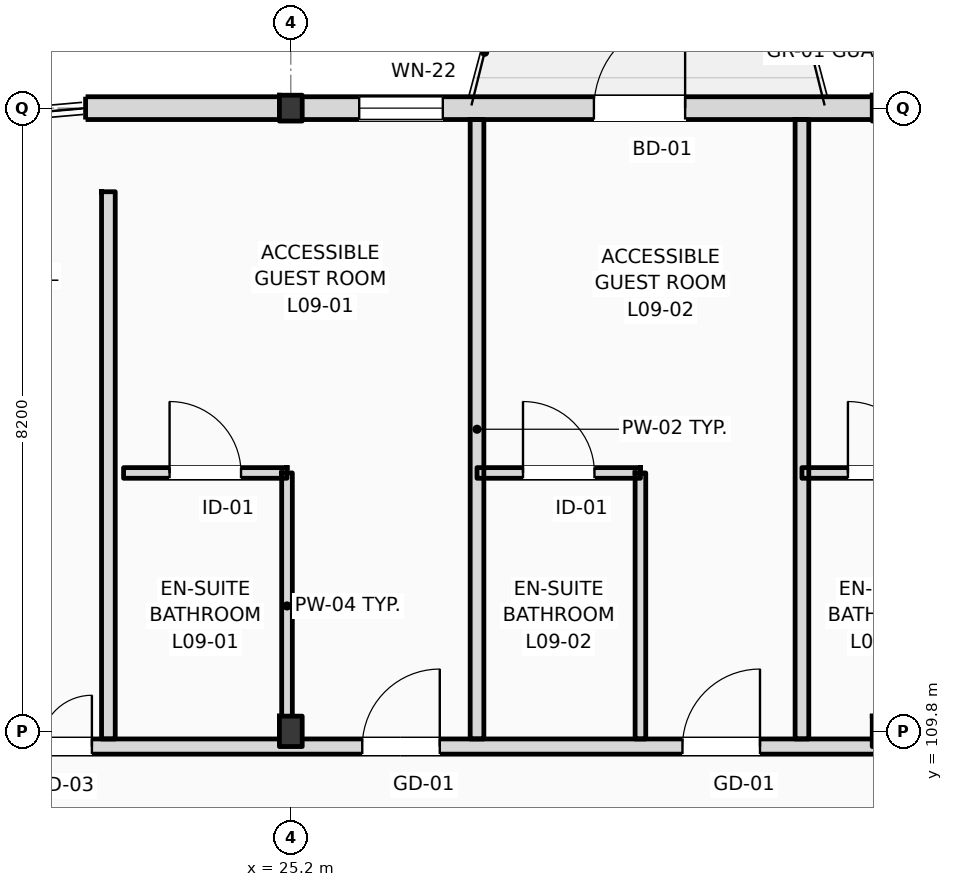
"""IFC4 building model, lengths in metres.
Left out: names, types, materials, properties, quantities, classifications, styles, units other than length and angle.
Written with IfcOpenShell. Run it as: python <this file> out.ifc"""

import sys

from ifc_helpers import new_model, si_unit, direction, frame, frame_2d, origin, origin_2d, place, context, subcontext, project, spatial, rectangle, i_section, extrude, element, fill, save


model = new_model("IFC4")
c1 = context("Model", 3, precision=1e-05, world=origin(), true_north=direction((0.0, 1.0)))
c2 = subcontext(c1, "Body", "Model", "MODEL_VIEW")
j1 = project(units=[si_unit("LENGTHUNIT", "METRE"), si_unit("PLANEANGLEUNIT", "RADIAN")], contexts=[c1])
p1 = place(None, origin())
s1 = spatial("IfcSite", under=j1, at=p1, CompositionType="ELEMENT")
p2 = place(p1, origin())
s2 = spatial("IfcBuilding", under=s1, at=p2, CompositionType="ELEMENT")
p3 = place(p2, frame((0.0, 0.0, 39.0)))
s3 = spatial("IfcBuildingStorey", under=s2, at=p3, CompositionType="ELEMENT", Elevation=39.0)
p4 = place(p3, frame((25.2, 109.8, 0.0), z_axis=(0.0, 0.0, 1.0), x_axis=(1.0, 0.0, 0.0)))
e1 = element("IfcColumn", 1, at=p4, inside=s3, PredefinedType="COLUMN", context=c2, shape_type="SweptSolid", body=[
    extrude(i_section(OverallWidth=0.3, OverallDepth=0.4, WebThickness=0.013, FlangeThickness=0.024, FilletRadius=0.027, at=origin_2d()), origin(), (0.0, 0.0, 1.0), 3.6),
])
p5 = place(p3, frame((25.2, 118.0, 0.0), z_axis=(0.0, 0.0, 1.0), x_axis=(1.0, 0.0, 0.0)))
e2 = element("IfcColumn", 2, at=p5, inside=s3, PredefinedType="COLUMN", context=c2, shape_type="SweptSolid", body=[
    extrude(i_section(OverallWidth=0.3, OverallDepth=0.34, WebThickness=0.012, FlangeThickness=0.021, FilletRadius=0.027, at=origin_2d()), origin(), (0.0, 0.0, 1.0), 3.6),
])
p6 = place(p3, frame((33.0, 109.8, 0.0), z_axis=(0.0, 0.0, 1.0), x_axis=(1.0, 0.0, 0.0)))
e3 = element("IfcColumn", 3, at=p6, inside=s3, PredefinedType="COLUMN", context=c2, shape_type="SweptSolid", body=[
    extrude(i_section(OverallWidth=0.3, OverallDepth=0.4, WebThickness=0.013, FlangeThickness=0.024, FilletRadius=0.027, at=origin_2d()), origin(), (0.0, 0.0, 1.0), 3.6),
])
p7 = place(p3, frame((33.0, 118.0, 0.0), z_axis=(0.0, 0.0, 1.0), x_axis=(1.0, 0.0, 0.0)))
e4 = element("IfcColumn", 4, at=p7, inside=s3, PredefinedType="COLUMN", context=c2, shape_type="SweptSolid", body=[
    extrude(i_section(OverallWidth=0.3, OverallDepth=0.34, WebThickness=0.012, FlangeThickness=0.021, FilletRadius=0.027, at=origin_2d()), origin(), (0.0, 0.0, 1.0), 3.6),
])
p8 = place(p3, frame((22.5, 118.0, 0.0), z_axis=(0.0, 0.0, 1.0), x_axis=(1.0, 0.0, 0.0)))
e5 = element("IfcWall", 5, at=p8, inside=s3, PredefinedType="STANDARD", context=c2, shape_type="SweptSolid", body=[
    extrude(rectangle(XDim=72.9, YDim=0.3, at=frame_2d((36.45, 0.0))), origin(), (0.0, 0.0, 1.0), 2.92),
])
p9 = place(p8, frame((3.6, 0.0, 0.9)))
e6 = element("IfcOpeningElement", 6, at=p9, cuts=e5, PredefinedType="OPENING", context=c2, shape_type="SweptSolid", body=[
    extrude(rectangle(XDim=1.1, YDim=1.6, at=frame_2d((0.55, 0.8))), frame((0.0, 0.16, 0.0), z_axis=(0.0, -1.0, 0.0), x_axis=(1.0, 0.0, 0.0)), (0.0, 0.0, 1.0), 0.32),
])
p10 = place(p8, frame((6.688, 0.0, 0.0)))
e7 = element("IfcOpeningElement", 7, at=p10, cuts=e5, PredefinedType="OPENING", context=c2, shape_type="SweptSolid", body=[
    extrude(rectangle(XDim=1.2, YDim=2.25, at=frame_2d((0.6, 1.125))), frame((0.0, 0.16, 0.0), z_axis=(0.0, -1.0, 0.0), x_axis=(1.0, 0.0, 0.0)), (0.0, 0.0, 1.0), 0.32),
])
p11 = place(p8, frame((11.388, 0.0, 0.9)))
e8 = element("IfcOpeningElement", 8, at=p11, cuts=e5, PredefinedType="OPENING", context=c2, shape_type="SweptSolid", body=[
    extrude(rectangle(XDim=1.6, YDim=1.75, at=frame_2d((0.8, 0.875))), frame((0.0, 0.16, 0.0), z_axis=(0.0, -1.0, 0.0), x_axis=(1.0, 0.0, 0.0)), (0.0, 0.0, 1.0), 0.32),
])
p12 = place(p8, frame((15.413, 0.0, 0.9)))
e9 = element("IfcOpeningElement", 9, at=p12, cuts=e5, PredefinedType="OPENING", context=c2, shape_type="SweptSolid", body=[
    extrude(rectangle(XDim=1.75, YDim=1.84, at=frame_2d((0.875, 0.92))), frame((0.0, 0.16, 0.0), z_axis=(0.0, -1.0, 0.0), x_axis=(1.0, 0.0, 0.0)), (0.0, 0.0, 1.0), 0.32),
])
p13 = place(p8, frame((21.245, 0.0, 0.0)))
e10 = element("IfcOpeningElement", 10, at=p13, cuts=e5, PredefinedType="OPENING", context=c2, shape_type="SweptSolid", body=[
    extrude(rectangle(XDim=1.2, YDim=2.25, at=frame_2d((0.6, 1.125))), frame((0.0, 0.16, 0.0), z_axis=(0.0, -1.0, 0.0), x_axis=(1.0, 0.0, 0.0)), (0.0, 0.0, 1.0), 0.32),
])
p14 = place(p8, frame((23.705, 0.0, 0.0)))
e11 = element("IfcOpeningElement", 11, at=p14, cuts=e5, PredefinedType="OPENING", context=c2, shape_type="SweptSolid", body=[
    extrude(rectangle(XDim=1.2, YDim=2.25, at=frame_2d((0.6, 1.125))), frame((0.0, 0.16, 0.0), z_axis=(0.0, -1.0, 0.0), x_axis=(1.0, 0.0, 0.0)), (0.0, 0.0, 1.0), 0.32),
])
p15 = place(p8, frame((28.488, 0.0, 0.9)))
e12 = element("IfcOpeningElement", 12, at=p15, cuts=e5, PredefinedType="OPENING", context=c2, shape_type="SweptSolid", body=[
    extrude(rectangle(XDim=2.6, YDim=1.84, at=frame_2d((1.3, 0.92))), frame((0.0, 0.16, 0.0), z_axis=(0.0, -1.0, 0.0), x_axis=(1.0, 0.0, 0.0)), (0.0, 0.0, 1.0), 0.32),
])
p16 = place(p8, frame((34.76, 0.0, 0.9)))
e13 = element("IfcOpeningElement", 13, at=p16, cuts=e5, PredefinedType="OPENING", context=c2, shape_type="SweptSolid", body=[
    extrude(rectangle(XDim=1.1, YDim=1.84, at=frame_2d((0.55, 0.92))), frame((0.0, 0.16, 0.0), z_axis=(0.0, -1.0, 0.0), x_axis=(1.0, 0.0, 0.0)), (0.0, 0.0, 1.0), 0.32),
])
p17 = place(p8, frame((38.143, 0.0, 0.0)))
e14 = element("IfcOpeningElement", 14, at=p17, cuts=e5, PredefinedType="OPENING", context=c2, shape_type="SweptSolid", body=[
    extrude(rectangle(XDim=1.2, YDim=2.25, at=frame_2d((0.6, 1.125))), frame((0.0, 0.16, 0.0), z_axis=(0.0, -1.0, 0.0), x_axis=(1.0, 0.0, 0.0)), (0.0, 0.0, 1.0), 0.32),
])
p18 = place(p8, frame((42.687, 0.0, 0.9)))
e15 = element("IfcOpeningElement", 15, at=p18, cuts=e5, PredefinedType="OPENING", context=c2, shape_type="SweptSolid", body=[
    extrude(rectangle(XDim=1.2, YDim=1.8, at=frame_2d((0.6, 0.9))), frame((0.0, 0.16, 0.0), z_axis=(0.0, -1.0, 0.0), x_axis=(1.0, 0.0, 0.0)), (0.0, 0.0, 1.0), 0.32),
])
p19 = place(p8, frame((47.112, 0.0, 0.9)))
e16 = element("IfcOpeningElement", 16, at=p19, cuts=e5, PredefinedType="OPENING", context=c2, shape_type="SweptSolid", body=[
    extrude(rectangle(XDim=1.35, YDim=1.84, at=frame_2d((0.675, 0.92))), frame((0.0, 0.16, 0.0), z_axis=(0.0, -1.0, 0.0), x_axis=(1.0, 0.0, 0.0)), (0.0, 0.0, 1.0), 0.32),
])
p20 = place(p8, frame((52.482, 0.0, 0.0)))
e17 = element("IfcOpeningElement", 17, at=p20, cuts=e5, PredefinedType="OPENING", context=c2, shape_type="SweptSolid", body=[
    extrude(rectangle(XDim=1.2, YDim=2.25, at=frame_2d((0.6, 1.125))), frame((0.0, 0.16, 0.0), z_axis=(0.0, -1.0, 0.0), x_axis=(1.0, 0.0, 0.0)), (0.0, 0.0, 1.0), 0.32),
])
p21 = place(p8, frame((54.942, 0.0, 0.0)))
e18 = element("IfcOpeningElement", 18, at=p21, cuts=e5, PredefinedType="OPENING", context=c2, shape_type="SweptSolid", body=[
    extrude(rectangle(XDim=1.2, YDim=2.25, at=frame_2d((0.6, 1.125))), frame((0.0, 0.16, 0.0), z_axis=(0.0, -1.0, 0.0), x_axis=(1.0, 0.0, 0.0)), (0.0, 0.0, 1.0), 0.32),
])
p22 = place(p8, frame((60.387, 0.0, 0.9)))
e19 = element("IfcOpeningElement", 19, at=p22, cuts=e5, PredefinedType="OPENING", context=c2, shape_type="SweptSolid", body=[
    extrude(rectangle(XDim=1.8, YDim=1.84, at=frame_2d((0.9, 0.92))), frame((0.0, 0.16, 0.0), z_axis=(0.0, -1.0, 0.0), x_axis=(1.0, 0.0, 0.0)), (0.0, 0.0, 1.0), 0.32),
])
p23 = place(p8, frame((66.013, 0.0, 0.9)))
e20 = element("IfcOpeningElement", 20, at=p23, cuts=e5, PredefinedType="OPENING", context=c2, shape_type="SweptSolid", body=[
    extrude(rectangle(XDim=1.35, YDim=1.84, at=frame_2d((0.675, 0.92))), frame((0.0, 0.16, 0.0), z_axis=(0.0, -1.0, 0.0), x_axis=(1.0, 0.0, 0.0)), (0.0, 0.0, 1.0), 0.32),
])
p24 = place(p8, frame((69.275, 0.0, 0.9)))
e21 = element("IfcOpeningElement", 21, at=p24, cuts=e5, PredefinedType="OPENING", context=c2, shape_type="SweptSolid", body=[
    extrude(rectangle(XDim=2.1, YDim=1.84, at=frame_2d((1.05, 0.92))), frame((0.0, 0.16, 0.0), z_axis=(0.0, -1.0, 0.0), x_axis=(1.0, 0.0, 0.0)), (0.0, 0.0, 1.0), 0.32),
])
p25 = place(p3, frame((10.65, 109.6, 0.0), z_axis=(0.0, 0.0, 1.0), x_axis=(1.0, 0.0, 0.0)))
e22 = element("IfcWall", 22, at=p25, inside=s3, PredefinedType="PARTITIONING", context=c2, shape_type="SweptSolid", body=[
    extrude(rectangle(XDim=84.61, YDim=0.2, at=frame_2d((42.305, 0.0))), origin(), (0.0, 0.0, 1.0), 2.82),
])
p26 = place(p25, frame((15.49, 0.0, 0.0)))
e23 = element("IfcOpeningElement", 23, at=p26, cuts=e22, PredefinedType="OPENING", context=c2, shape_type="SweptSolid", body=[
    extrude(rectangle(XDim=1.02, YDim=2.2, at=frame_2d((0.51, 1.1))), frame((0.0, 0.11, 0.0), z_axis=(0.0, -1.0, 0.0), x_axis=(1.0, 0.0, 0.0)), (0.0, 0.0, 1.0), 0.22),
])
p27 = place(p25, frame((19.703, 0.0, 0.0)))
e24 = element("IfcOpeningElement", 24, at=p27, cuts=e22, PredefinedType="OPENING", context=c2, shape_type="SweptSolid", body=[
    extrude(rectangle(XDim=1.02, YDim=2.2, at=frame_2d((0.51, 1.1))), frame((0.0, 0.11, 0.0), z_axis=(0.0, -1.0, 0.0), x_axis=(1.0, 0.0, 0.0)), (0.0, 0.0, 1.0), 0.22),
])
p28 = place(p25, frame((24.203, 0.0, 0.0)))
e25 = element("IfcOpeningElement", 25, at=p28, cuts=e22, PredefinedType="OPENING", context=c2, shape_type="SweptSolid", body=[
    extrude(rectangle(XDim=1.02, YDim=2.2, at=frame_2d((0.51, 1.1))), frame((0.0, 0.11, 0.0), z_axis=(0.0, -1.0, 0.0), x_axis=(1.0, 0.0, 0.0)), (0.0, 0.0, 1.0), 0.22),
])
p29 = place(p25, frame((26.552, 0.0, 0.0)))
e26 = element("IfcOpeningElement", 26, at=p29, cuts=e22, PredefinedType="OPENING", context=c2, shape_type="SweptSolid", body=[
    extrude(rectangle(XDim=1.02, YDim=2.2, at=frame_2d((0.51, 1.1))), frame((0.0, 0.11, 0.0), z_axis=(0.0, -1.0, 0.0), x_axis=(1.0, 0.0, 0.0)), (0.0, 0.0, 1.0), 0.22),
])
p30 = place(p25, frame((33.233, 0.0, 0.0)))
e27 = element("IfcOpeningElement", 27, at=p30, cuts=e22, PredefinedType="OPENING", context=c2, shape_type="SweptSolid", body=[
    extrude(rectangle(XDim=0.96, YDim=2.2, at=frame_2d((0.48, 1.1))), frame((0.0, 0.11, 0.0), z_axis=(0.0, -1.0, 0.0), x_axis=(1.0, 0.0, 0.0)), (0.0, 0.0, 1.0), 0.22),
])
p31 = place(p25, frame((35.583, 0.0, 0.0)))
e28 = element("IfcOpeningElement", 28, at=p31, cuts=e22, PredefinedType="OPENING", context=c2, shape_type="SweptSolid", body=[
    extrude(rectangle(XDim=0.96, YDim=2.2, at=frame_2d((0.48, 1.1))), frame((0.0, 0.11, 0.0), z_axis=(0.0, -1.0, 0.0), x_axis=(1.0, 0.0, 0.0)), (0.0, 0.0, 1.0), 0.22),
])
p32 = place(p25, frame((42.233, 0.0, 0.0)))
e29 = element("IfcOpeningElement", 29, at=p32, cuts=e22, PredefinedType="OPENING", context=c2, shape_type="SweptSolid", body=[
    extrude(rectangle(XDim=0.96, YDim=2.2, at=frame_2d((0.48, 1.1))), frame((0.0, 0.11, 0.0), z_axis=(0.0, -1.0, 0.0), x_axis=(1.0, 0.0, 0.0)), (0.0, 0.0, 1.0), 0.22),
])
p33 = place(p25, frame((46.983, 0.0, 0.0)))
e30 = element("IfcOpeningElement", 30, at=p33, cuts=e22, PredefinedType="OPENING", context=c2, shape_type="SweptSolid", body=[
    extrude(rectangle(XDim=0.96, YDim=2.2, at=frame_2d((0.48, 1.1))), frame((0.0, 0.11, 0.0), z_axis=(0.0, -1.0, 0.0), x_axis=(1.0, 0.0, 0.0)), (0.0, 0.0, 1.0), 0.22),
])
p34 = place(p25, frame((51.233, 0.0, 0.0)))
e31 = element("IfcOpeningElement", 31, at=p34, cuts=e22, PredefinedType="OPENING", context=c2, shape_type="SweptSolid", body=[
    extrude(rectangle(XDim=0.96, YDim=2.2, at=frame_2d((0.48, 1.1))), frame((0.0, 0.11, 0.0), z_axis=(0.0, -1.0, 0.0), x_axis=(1.0, 0.0, 0.0)), (0.0, 0.0, 1.0), 0.22),
])
p35 = place(p25, frame((55.733, 0.0, 0.0)))
e32 = element("IfcOpeningElement", 32, at=p35, cuts=e22, PredefinedType="OPENING", context=c2, shape_type="SweptSolid", body=[
    extrude(rectangle(XDim=0.96, YDim=2.2, at=frame_2d((0.48, 1.1))), frame((0.0, 0.11, 0.0), z_axis=(0.0, -1.0, 0.0), x_axis=(1.0, 0.0, 0.0)), (0.0, 0.0, 1.0), 0.22),
])
p36 = place(p25, frame((58.083, 0.0, 0.0)))
e33 = element("IfcOpeningElement", 33, at=p36, cuts=e22, PredefinedType="OPENING", context=c2, shape_type="SweptSolid", body=[
    extrude(rectangle(XDim=0.96, YDim=2.2, at=frame_2d((0.48, 1.1))), frame((0.0, 0.11, 0.0), z_axis=(0.0, -1.0, 0.0), x_axis=(1.0, 0.0, 0.0)), (0.0, 0.0, 1.0), 0.22),
])
p37 = place(p25, frame((64.732, 0.0, 0.0)))
e34 = element("IfcOpeningElement", 34, at=p37, cuts=e22, PredefinedType="OPENING", context=c2, shape_type="SweptSolid", body=[
    extrude(rectangle(XDim=0.96, YDim=2.2, at=frame_2d((0.48, 1.1))), frame((0.0, 0.11, 0.0), z_axis=(0.0, -1.0, 0.0), x_axis=(1.0, 0.0, 0.0)), (0.0, 0.0, 1.0), 0.22),
])
p38 = place(p25, frame((66.832, 0.0, 0.0)))
e35 = element("IfcOpeningElement", 35, at=p38, cuts=e22, PredefinedType="OPENING", context=c2, shape_type="SweptSolid", body=[
    extrude(rectangle(XDim=0.96, YDim=2.2, at=frame_2d((0.48, 1.1))), frame((0.0, 0.11, 0.0), z_axis=(0.0, -1.0, 0.0), x_axis=(1.0, 0.0, 0.0)), (0.0, 0.0, 1.0), 0.22),
])
p39 = place(p25, frame((73.732, 0.0, 0.0)))
e36 = element("IfcOpeningElement", 36, at=p39, cuts=e22, PredefinedType="OPENING", context=c2, shape_type="SweptSolid", body=[
    extrude(rectangle(XDim=0.96, YDim=2.2, at=frame_2d((0.48, 1.1))), frame((0.0, 0.11, 0.0), z_axis=(0.0, -1.0, 0.0), x_axis=(1.0, 0.0, 0.0)), (0.0, 0.0, 1.0), 0.22),
])
p40 = place(p25, frame((78.233, 0.0, 0.0)))
e37 = element("IfcOpeningElement", 37, at=p40, cuts=e22, PredefinedType="OPENING", context=c2, shape_type="SweptSolid", body=[
    extrude(rectangle(XDim=0.96, YDim=2.2, at=frame_2d((0.48, 1.1))), frame((0.0, 0.11, 0.0), z_axis=(0.0, -1.0, 0.0), x_axis=(1.0, 0.0, 0.0)), (0.0, 0.0, 1.0), 0.22),
])
p41 = place(p25, frame((80.62, 0.0, 0.0)))
e38 = element("IfcOpeningElement", 38, at=p41, cuts=e22, PredefinedType="OPENING", context=c2, shape_type="SweptSolid", body=[
    extrude(rectangle(XDim=0.96, YDim=2.2, at=frame_2d((0.48, 1.1))), frame((0.0, 0.11, 0.0), z_axis=(0.0, -1.0, 0.0), x_axis=(1.0, 0.0, 0.0)), (0.0, 0.0, 1.0), 0.22),
])
p42 = place(p25, frame((2.716, 0.0, 0.0)))
e39 = element("IfcOpeningElement", 39, at=p42, cuts=e22, PredefinedType="OPENING", context=c2, shape_type="SweptSolid", body=[
    extrude(rectangle(XDim=1.35, YDim=2.25, at=frame_2d((0.675, 1.125))), frame((0.0, 0.11, 0.0), z_axis=(0.0, -1.0, 0.0), x_axis=(1.0, 0.0, 0.0)), (0.0, 0.0, 1.0), 0.22),
])
p43 = place(p25, frame((6.65, 0.0, 0.0)))
e40 = element("IfcOpeningElement", 40, at=p43, cuts=e22, PredefinedType="OPENING", context=c2, shape_type="SweptSolid", body=[
    extrude(rectangle(XDim=1.35, YDim=2.25, at=frame_2d((0.675, 1.125))), frame((0.0, 0.11, 0.0), z_axis=(0.0, -1.0, 0.0), x_axis=(1.0, 0.0, 0.0)), (0.0, 0.0, 1.0), 0.22),
])
p44 = place(p25, frame((10.583, 0.0, 0.0)))
e41 = element("IfcOpeningElement", 41, at=p44, cuts=e22, PredefinedType="OPENING", context=c2, shape_type="SweptSolid", body=[
    extrude(rectangle(XDim=1.35, YDim=2.25, at=frame_2d((0.675, 1.125))), frame((0.0, 0.11, 0.0), z_axis=(0.0, -1.0, 0.0), x_axis=(1.0, 0.0, 0.0)), (0.0, 0.0, 1.0), 0.22),
])
p45 = place(p3, frame((27.65, 109.7, 0.0), z_axis=(0.0, 0.0, 1.0), x_axis=(0.0, 1.0, 0.0)))
e42 = element("IfcWall", 42, at=p45, inside=s3, PredefinedType="PARTITIONING", context=c2, shape_type="SweptSolid", body=[
    extrude(rectangle(XDim=8.15, YDim=0.18, at=frame_2d((4.075, 0.0))), origin(), (0.0, 0.0, 1.0), 3.07),
])
p46 = place(p3, frame((25.15, 109.7, 0.0), z_axis=(0.0, 0.0, 1.0), x_axis=(0.0, 1.0, 0.0)))
e43 = element("IfcWall", 43, at=p46, inside=s3, PredefinedType="PARTITIONING", context=c2, shape_type="SweptSolid", body=[
    extrude(rectangle(XDim=3.5, YDim=0.14, at=frame_2d((1.75, 0.0))), origin(), (0.0, 0.0, 1.0), 3.01),
])
p47 = place(p3, frame((23.0, 113.2, 0.0), z_axis=(0.0, 0.0, 1.0), x_axis=(1.0, 0.0, 0.0)))
e44 = element("IfcWall", 44, at=p47, inside=s3, PredefinedType="PARTITIONING", context=c2, shape_type="SweptSolid", body=[
    extrude(rectangle(XDim=2.15, YDim=0.14, at=frame_2d((1.075, 0.0))), origin(), (0.0, 0.0, 1.0), 3.38),
])
p48 = place(p47, frame((0.605, 0.0, 0.0)))
e45 = element("IfcOpeningElement", 45, at=p48, cuts=e44, PredefinedType="OPENING", context=c2, shape_type="SweptSolid", body=[
    extrude(rectangle(XDim=0.94, YDim=2.15, at=frame_2d((0.47, 1.075))), frame((0.0, 0.08, 0.0), z_axis=(0.0, -1.0, 0.0), x_axis=(1.0, 0.0, 0.0)), (0.0, 0.0, 1.0), 0.16),
])
p49 = place(p3, frame((31.925, 109.7, 0.0), z_axis=(0.0, 0.0, 1.0), x_axis=(0.0, 1.0, 0.0)))
e46 = element("IfcWall", 46, at=p49, inside=s3, PredefinedType="PARTITIONING", context=c2, shape_type="SweptSolid", body=[
    extrude(rectangle(XDim=8.15, YDim=0.18, at=frame_2d((4.075, 0.0))), origin(), (0.0, 0.0, 1.0), 3.38),
])
p50 = place(p3, frame((29.8, 109.7, 0.0), z_axis=(0.0, 0.0, 1.0), x_axis=(0.0, 1.0, 0.0)))
e47 = element("IfcWall", 47, at=p50, inside=s3, PredefinedType="PARTITIONING", context=c2, shape_type="SweptSolid", body=[
    extrude(rectangle(XDim=3.5, YDim=0.14, at=frame_2d((1.75, 0.0))), origin(), (0.0, 0.0, 1.0), 3.38),
])
p51 = place(p3, frame((27.65, 113.2, 0.0), z_axis=(0.0, 0.0, 1.0), x_axis=(1.0, 0.0, 0.0)))
e48 = element("IfcWall", 48, at=p51, inside=s3, PredefinedType="PARTITIONING", context=c2, shape_type="SweptSolid", body=[
    extrude(rectangle(XDim=2.15, YDim=0.14, at=frame_2d((1.075, 0.0))), origin(), (0.0, 0.0, 1.0), 3.38),
])
p52 = place(p51, frame((0.605, 0.0, 0.0)))
e49 = element("IfcOpeningElement", 49, at=p52, cuts=e48, PredefinedType="OPENING", context=c2, shape_type="SweptSolid", body=[
    extrude(rectangle(XDim=0.94, YDim=2.15, at=frame_2d((0.47, 1.075))), frame((0.0, 0.08, 0.0), z_axis=(0.0, -1.0, 0.0), x_axis=(1.0, 0.0, 0.0)), (0.0, 0.0, 1.0), 0.16),
])
p53 = place(p3, frame((31.925, 113.2, 0.0), z_axis=(0.0, 0.0, 1.0), x_axis=(1.0, 0.0, 0.0)))
e50 = element("IfcWall", 50, at=p53, inside=s3, PredefinedType="PARTITIONING", context=c2, shape_type="SweptSolid", body=[
    extrude(rectangle(XDim=2.15, YDim=0.14, at=frame_2d((1.075, 0.0))), origin(), (0.0, 0.0, 1.0), 3.38),
])
p54 = place(p53, frame((0.605, 0.0, 0.0)))
e51 = element("IfcOpeningElement", 51, at=p54, cuts=e50, PredefinedType="OPENING", context=c2, shape_type="SweptSolid", body=[
    extrude(rectangle(XDim=0.94, YDim=2.15, at=frame_2d((0.47, 1.075))), frame((0.0, 0.08, 0.0), z_axis=(0.0, -1.0, 0.0), x_axis=(1.0, 0.0, 0.0)), (0.0, 0.0, 1.0), 0.16),
])
p55 = place(p3, frame((22.8, 109.7, 0.0), z_axis=(0.0, 0.0, 1.0), x_axis=(0.0, 1.0, 0.0)))
e52 = element("IfcWall", 52, at=p55, inside=s3, PredefinedType="PARTITIONING", context=c2, shape_type="SweptSolid", body=[
    extrude(rectangle(XDim=7.2, YDim=0.18, at=frame_2d((3.6, 0.0))), origin(), (0.0, 0.0, 1.0), 3.38),
])
p56 = place(p9, origin())
e53 = element("IfcWindow", 53, at=p56, inside=s3, PartitioningType="DOUBLE_PANEL_VERTICAL", PredefinedType="WINDOW", context=c2, shape_type="SweptSolid", body=[
    extrude(rectangle(XDim=1.1, YDim=1.6, at=frame_2d((0.55, 0.8))), frame((0.0, 0.03, 0.0), z_axis=(0.0, -1.0, 0.0), x_axis=(1.0, 0.0, 0.0)), (0.0, 0.0, 1.0), 0.06),
])
fill(e6, e53)
p57 = place(p10, origin())
e54 = element("IfcDoor", 54, at=p57, inside=s3, OperationType="SINGLE_SWING_RIGHT", PredefinedType="DOOR", context=c2, shape_type="SweptSolid", body=[
    extrude(rectangle(XDim=1.2, YDim=2.25, at=frame_2d((0.6, 1.125))), frame((0.0, 0.025, 0.0), z_axis=(0.0, -1.0, 0.0), x_axis=(1.0, 0.0, 0.0)), (0.0, 0.0, 1.0), 0.05),
])
fill(e7, e54)
p58 = place(p26, origin())
e55 = element("IfcDoor", 55, at=p58, inside=s3, OperationType="SINGLE_SWING_RIGHT", PredefinedType="DOOR", context=c2, shape_type="SweptSolid", body=[
    extrude(rectangle(XDim=1.02, YDim=2.2, at=frame_2d((0.51, 1.1))), frame((0.0, 0.025, 0.0), z_axis=(0.0, -1.0, 0.0), x_axis=(1.0, 0.0, 0.0)), (0.0, 0.0, 1.0), 0.05),
])
fill(e23, e55)
p59 = place(p48, origin())
e56 = element("IfcDoor", 56, at=p59, inside=s3, OperationType="SINGLE_SWING_LEFT", PredefinedType="DOOR", context=c2, shape_type="SweptSolid", body=[
    extrude(rectangle(XDim=0.94, YDim=2.15, at=frame_2d((0.47, 1.075))), frame((0.0, 0.025, 0.0), z_axis=(0.0, -1.0, 0.0), x_axis=(1.0, 0.0, 0.0)), (0.0, 0.0, 1.0), 0.05),
])
fill(e45, e56)
p60 = place(p27, origin())
e57 = element("IfcDoor", 57, at=p60, inside=s3, OperationType="SINGLE_SWING_RIGHT", PredefinedType="DOOR", context=c2, shape_type="SweptSolid", body=[
    extrude(rectangle(XDim=1.02, YDim=2.2, at=frame_2d((0.51, 1.1))), frame((0.0, 0.025, 0.0), z_axis=(0.0, -1.0, 0.0), x_axis=(1.0, 0.0, 0.0)), (0.0, 0.0, 1.0), 0.05),
])
fill(e24, e57)
p61 = place(p52, origin())
e58 = element("IfcDoor", 58, at=p61, inside=s3, OperationType="SINGLE_SWING_LEFT", PredefinedType="DOOR", context=c2, shape_type="SweptSolid", body=[
    extrude(rectangle(XDim=0.94, YDim=2.15, at=frame_2d((0.47, 1.075))), frame((0.0, 0.025, 0.0), z_axis=(0.0, -1.0, 0.0), x_axis=(1.0, 0.0, 0.0)), (0.0, 0.0, 1.0), 0.05),
])
fill(e49, e58)
p62 = place(p54, origin())
e59 = element("IfcDoor", 59, at=p62, inside=s3, OperationType="SINGLE_SWING_LEFT", PredefinedType="DOOR", context=c2, shape_type="SweptSolid", body=[
    extrude(rectangle(XDim=0.94, YDim=2.15, at=frame_2d((0.47, 1.075))), frame((0.0, 0.025, 0.0), z_axis=(0.0, -1.0, 0.0), x_axis=(1.0, 0.0, 0.0)), (0.0, 0.0, 1.0), 0.05),
])
fill(e51, e59)
p63 = place(p44, origin())
e60 = element("IfcDoor", 60, at=p63, inside=s3, OperationType="DOUBLE_SWING_LEFT", PredefinedType="DOOR", context=c2, shape_type="SweptSolid", body=[
    extrude(rectangle(XDim=1.35, YDim=2.25, at=frame_2d((0.675, 1.125))), frame((0.0, 0.025, 0.0), z_axis=(0.0, -1.0, 0.0), x_axis=(1.0, 0.0, 0.0)), (0.0, 0.0, 1.0), 0.05),
])
fill(e41, e60)
save(model, sys.argv[1])
